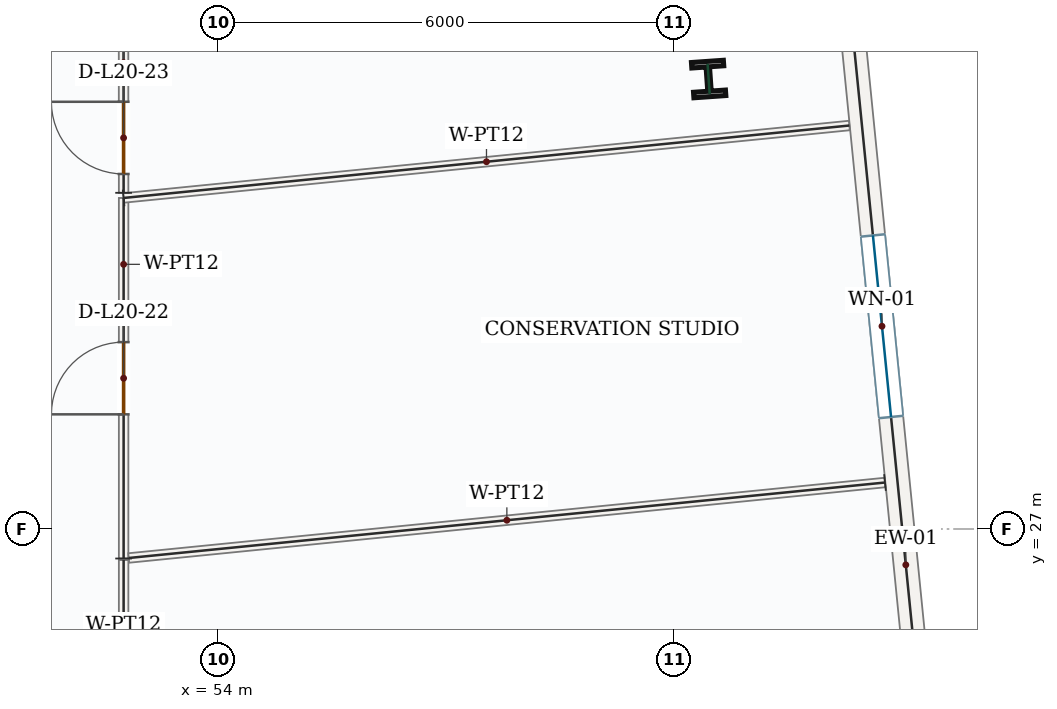
"""IFC4 building model, lengths in metres.
Left out: names, types, materials, properties, quantities, classifications, styles, units other than length and angle.
Written with IfcOpenShell. Run it as: python <this file> out.ifc"""

import sys

from ifc_helpers import new_model, si_unit, direction, frame, frame_2d, origin, origin_2d, place, context, subcontext, project, spatial, rectangle, i_section, extrude, source, transform, mapped, element, fill, save


model = new_model("IFC4")
c1 = context("Model", 3, precision=1e-05, world=origin(), true_north=direction((0.0, 1.0)))
c2 = subcontext(c1, "Body", "Model", "MODEL_VIEW")
j1 = project(units=[si_unit("LENGTHUNIT", "METRE"), si_unit("PLANEANGLEUNIT", "RADIAN")], contexts=[c1])
p1 = place(None, origin())
s1 = spatial("IfcSite", under=j1, at=p1, CompositionType="ELEMENT")
p2 = place(p1, origin())
s2 = spatial("IfcBuilding", under=s1, at=p2, CompositionType="ELEMENT")
p3 = place(p2, frame((0.0, 0.0, 92.1)))
s3 = spatial("IfcBuildingStorey", under=s2, at=p3, CompositionType="ELEMENT", Elevation=92.1)
m1 = source(origin(), c2, "Body", "SweptSolid", [
    extrude(i_section(OverallWidth=0.421, OverallDepth=0.465, WebThickness=0.045, FlangeThickness=0.073, FilletRadius=0.018, at=origin_2d()), origin(), (0.0, 0.0, 1.0), 4.2),
])
p4 = place(p3, frame((60.447, 32.92, 0.0), z_axis=(0.0, 0.0, 1.0), x_axis=(0.99756405026, 0.069756473744, 0.0)))
e1 = element("IfcColumn", 1, at=p4, inside=s3, PredefinedType="COLUMN", context=c2, shape_type="MappedRepresentation", body=[
    mapped(m1, transform((0.0, 0.0, 0.0), x_axis=(1.0, 0.0, 0.0), y_axis=(0.0, 1.0, 0.0), z_axis=(0.0, 0.0, 1.0), scale=1.0)),
])
p5 = place(p3, frame((62.235, 34.603, 0.0), z_axis=(0.0, 0.0, 1.0), x_axis=(0.099303907908, -0.995057151059, 0.0)))
e2 = element("IfcWall", 2, at=p5, inside=s3, PredefinedType="SOLIDWALL", context=c2, shape_type="SweptSolid", body=[
    extrude(rectangle(XDim=9.92, YDim=0.32, at=frame_2d((4.96, 0.0))), origin(), (0.0, 0.0, 1.0), 3.95),
])
p6 = place(p5, frame((3.76, 0.0, 0.85)))
e3 = element("IfcOpeningElement", 3, at=p6, cuts=e2, PredefinedType="OPENING", context=c2, shape_type="SweptSolid", body=[
    extrude(rectangle(XDim=2.4, YDim=1.8, at=frame_2d((1.2, 0.9))), frame((0.0, 0.17, 0.0), z_axis=(0.0, -1.0, 0.0), x_axis=(1.0, 0.0, 0.0)), (0.0, 0.0, 1.0), 0.34),
])
p7 = place(p3, frame((52.75, 26.612, 0.0), z_axis=(0.0, 0.0, 1.0), x_axis=(0.0, 1.0, 0.0)))
e4 = element("IfcWall", 4, at=p7, inside=s3, PredefinedType="PARTITIONING", context=c2, shape_type="SweptSolid", body=[
    extrude(rectangle(XDim=4.743, YDim=0.125, at=frame_2d((2.372, 0.0))), origin(), (0.0, 0.0, 1.0), 3.95),
])
p8 = place(p7, frame((1.897, 0.0, 0.0)))
e5 = element("IfcOpeningElement", 5, at=p8, cuts=e4, PredefinedType="OPENING", context=c2, shape_type="SweptSolid", body=[
    extrude(rectangle(XDim=0.95, YDim=2.15, at=frame_2d((0.475, 1.075))), frame((0.0, 0.073, 0.0), z_axis=(0.0, -1.0, 0.0), x_axis=(1.0, 0.0, 0.0)), (0.0, 0.0, 1.0), 0.145),
])
m2 = source(origin(), c2, "Body", "SweptSolid", [
    extrude(rectangle(XDim=9.595, YDim=0.125, at=frame_2d((4.798, 0.0))), origin(), (0.0, 0.0, 1.0), 3.95),
])
p9 = place(p3, frame((52.75, 31.355, 0.0), z_axis=(0.0, 0.0, 1.0), x_axis=(0.995054305912, 0.099332413068, 0.0)))
e6 = element("IfcWall", 6, at=p9, inside=s3, PredefinedType="PARTITIONING", context=c2, shape_type="MappedRepresentation", body=[
    mapped(m2, transform((0.0, 0.0, 0.0), x_axis=(1.0, 0.0, 0.0), y_axis=(0.0, 1.0, 0.0), z_axis=(0.0, 0.0, 1.0), scale=1.0)),
])
m3 = source(origin(), c2, "Body", "SweptSolid", [
    extrude(rectangle(XDim=9.999, YDim=0.125, at=frame_2d((5.0, 0.0))), origin(), (0.0, 0.0, 1.0), 3.95),
])
p10 = place(p3, frame((62.767, 27.612, 0.0), z_axis=(0.0, 0.0, 1.0), x_axis=(-0.995054581391, -0.099329653443, 0.0)))
e7 = element("IfcWall", 7, at=p10, inside=s3, PredefinedType="PARTITIONING", context=c2, shape_type="MappedRepresentation", body=[
    mapped(m3, transform((0.0, 0.0, 0.0), x_axis=(1.0, 0.0, 0.0), y_axis=(0.0, 1.0, 0.0), z_axis=(0.0, 0.0, 1.0), scale=1.0)),
])
p11 = place(p3, frame((52.75, 31.423, 0.0), z_axis=(0.0, 0.0, 1.0), x_axis=(-0.000470366834, 0.999999889378, 0.0)))
e8 = element("IfcWall", 8, at=p11, inside=s3, PredefinedType="PARTITIONING", context=c2, shape_type="SweptSolid", body=[
    extrude(rectangle(XDim=2.076, YDim=0.125, at=frame_2d((1.038, 0.0))), origin(), (0.0, 0.0, 1.0), 3.95),
])
p12 = place(p11, frame((0.248, 0.0, 0.0)))
e9 = element("IfcOpeningElement", 9, at=p12, cuts=e8, PredefinedType="OPENING", context=c2, shape_type="SweptSolid", body=[
    extrude(rectangle(XDim=0.95, YDim=2.15, at=frame_2d((0.475, 1.075))), frame((0.0, 0.073, 0.0), z_axis=(0.0, -1.0, 0.0), x_axis=(1.0, 0.0, 0.0)), (0.0, 0.0, 1.0), 0.145),
])
p13 = place(p3, frame((52.75, 20.568, 0.0), z_axis=(0.0, 0.0, 1.0), x_axis=(0.0, 1.0, 0.0)))
e10 = element("IfcWall", 10, at=p13, inside=s3, PredefinedType="PARTITIONING", context=c2, shape_type="SweptSolid", body=[
    extrude(rectangle(XDim=6.024, YDim=0.125, at=frame_2d((3.012, 0.0))), origin(), (0.0, 0.0, 1.0), 3.95),
])
p14 = place(p13, frame((2.537, 0.0, 0.0)))
e11 = element("IfcOpeningElement", 11, at=p14, cuts=e10, PredefinedType="OPENING", context=c2, shape_type="SweptSolid", body=[
    extrude(rectangle(XDim=0.95, YDim=2.15, at=frame_2d((0.475, 1.075))), frame((0.0, 0.073, 0.0), z_axis=(0.0, -1.0, 0.0), x_axis=(1.0, 0.0, 0.0)), (0.0, 0.0, 1.0), 0.145),
])
m4 = source(origin(), c2, "Body", "SweptSolid", [
    extrude(rectangle(XDim=2.4, YDim=1.8, at=frame_2d((1.2, 0.9))), frame((0.0, 0.03, 0.0), z_axis=(0.0, -1.0, 0.0), x_axis=(1.0, 0.0, 0.0)), (0.0, 0.0, 1.0), 0.06),
])
p15 = place(p6, origin())
e12 = element("IfcWindow", 12, at=p15, inside=s3, PartitioningType="DOUBLE_PANEL_VERTICAL", PredefinedType="WINDOW", context=c2, shape_type="MappedRepresentation", body=[
    mapped(m4, transform((0.0, 0.0, 0.0), x_axis=(1.0, 0.0, 0.0), y_axis=(0.0, 1.0, 0.0), z_axis=(0.0, 0.0, 1.0), scale=1.0)),
])
fill(e3, e12)
m5 = source(origin(), c2, "Body", "SweptSolid", [
    extrude(rectangle(XDim=0.95, YDim=2.15, at=frame_2d((0.475, 1.075))), frame((0.0, 0.025, 0.0), z_axis=(0.0, -1.0, 0.0), x_axis=(1.0, 0.0, 0.0)), (0.0, 0.0, 1.0), 0.05),
])
p16 = place(p8, origin())
e13 = element("IfcDoor", 13, at=p16, inside=s3, OperationType="SINGLE_SWING_LEFT", PredefinedType="DOOR", context=c2, shape_type="MappedRepresentation", body=[
    mapped(m5, transform((0.0, 0.0, 0.0), x_axis=(1.0, 0.0, 0.0), y_axis=(0.0, 1.0, 0.0), z_axis=(0.0, 0.0, 1.0), scale=1.0)),
])
fill(e5, e13)
p17 = place(p12, origin())
e14 = element("IfcDoor", 14, at=p17, inside=s3, OperationType="SINGLE_SWING_RIGHT", PredefinedType="DOOR", context=c2, shape_type="MappedRepresentation", body=[
    mapped(m5, transform((0.0, 0.0, 0.0), x_axis=(1.0, 0.0, 0.0), y_axis=(0.0, 1.0, 0.0), z_axis=(0.0, 0.0, 1.0), scale=1.0)),
])
fill(e9, e14)
save(model, sys.argv[1])
